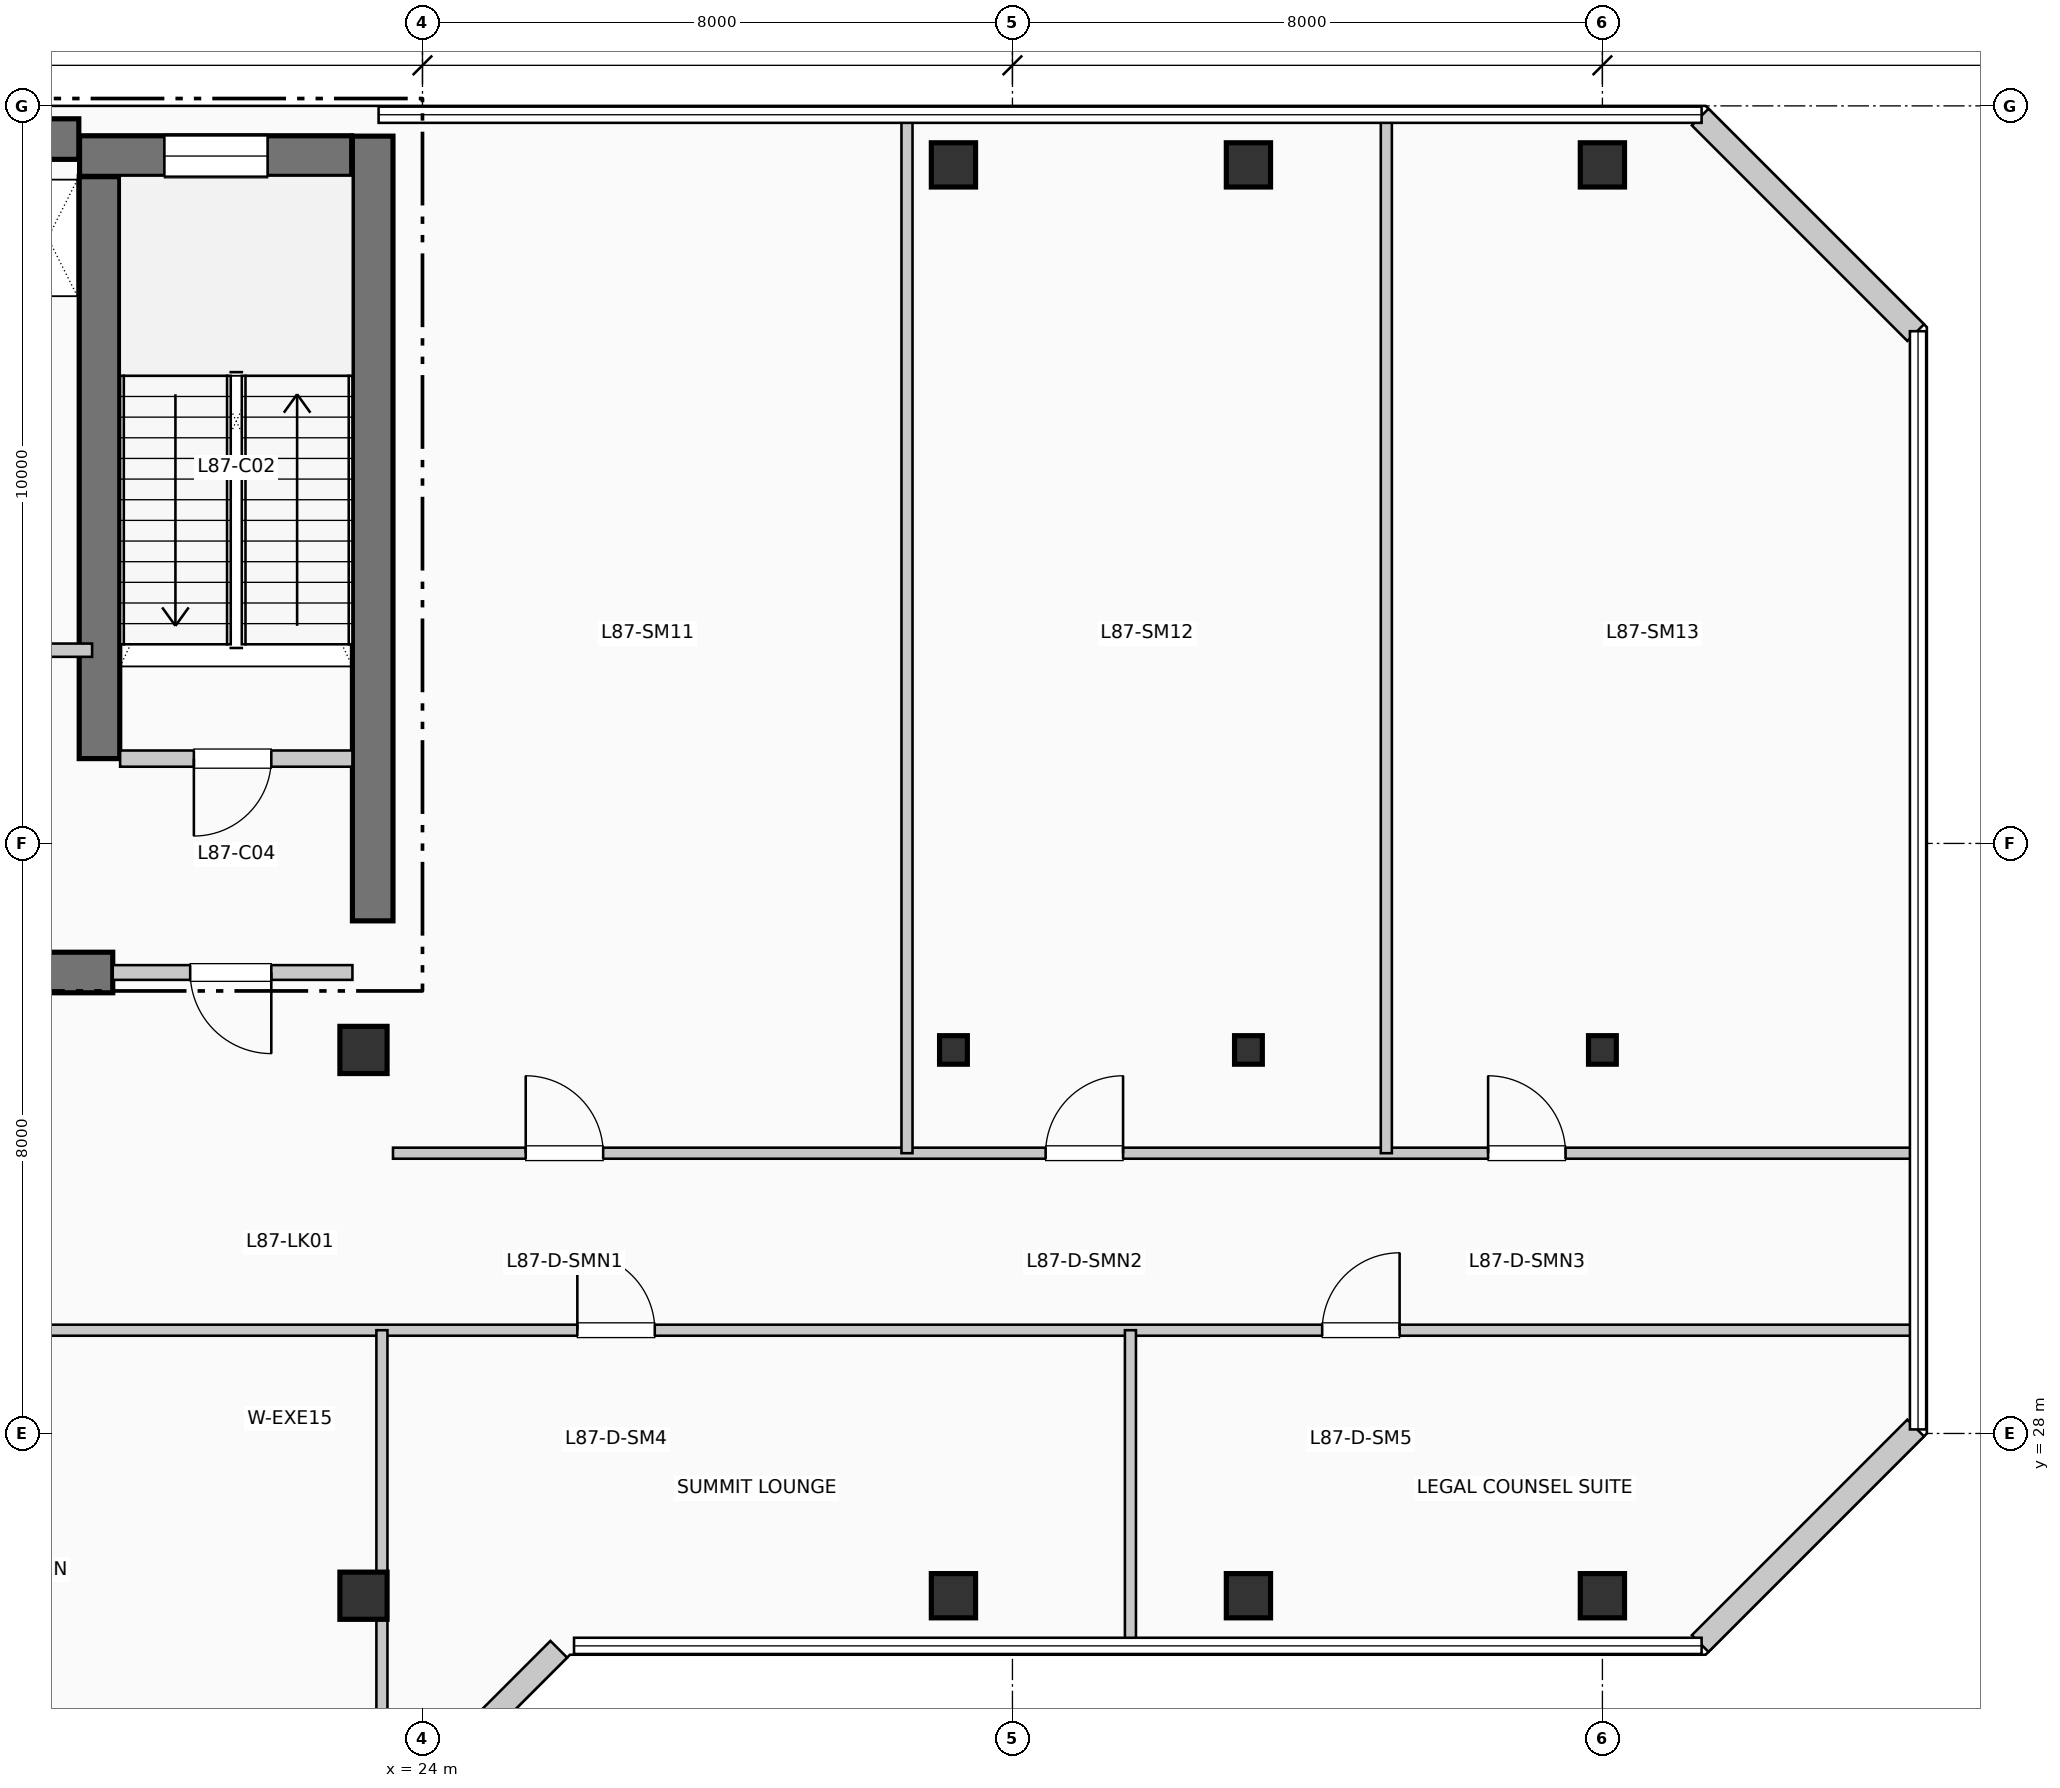
"""IFC4 building model, lengths in metres.
Left out: names, types, materials, properties, quantities, classifications, styles, units other than length and angle.
Written with IfcOpenShell. Run it as: python <this file> out.ifc"""

import sys

from ifc_helpers import new_model, si_unit, direction, frame, frame_2d, origin, origin_2d, place, context, subcontext, project, spatial, rectangle, i_section, extrude, element, fill, save


model = new_model("IFC4")
c1 = context("Model", 3, precision=1e-05, world=origin(), true_north=direction((0.0, 1.0)))
c2 = subcontext(c1, "Body", "Model", "MODEL_VIEW")
j1 = project(units=[si_unit("LENGTHUNIT", "METRE"), si_unit("PLANEANGLEUNIT", "RADIAN")], contexts=[c1])
p1 = place(None, origin())
s1 = spatial("IfcSite", under=j1, at=p1, CompositionType="ELEMENT")
p2 = place(p1, origin())
s2 = spatial("IfcBuilding", under=s1, at=p2, CompositionType="ELEMENT")
p3 = place(p2, frame((0.0, 0.0, 356.73)))
s3 = spatial("IfcBuildingStorey", under=s2, at=p3, CompositionType="ELEMENT", Elevation=356.73)
p4 = place(p3, frame((5.36, 45.55, 0.0), z_axis=(0.0, 0.0, 1.0), x_axis=(1.0, 0.0, 0.0)))
e1 = element("IfcWall", 1, at=p4, inside=s3, PredefinedType="SHEAR", context=c2, shape_type="SweptSolid", body=[
    extrude(rectangle(XDim=13.98, YDim=0.55, at=frame_2d((6.99, 0.0))), origin(), (0.0, 0.0, 1.0), 4.62),
])
p5 = place(p3, frame((23.325, 34.95, 0.0), z_axis=(0.0, 0.0, 1.0), x_axis=(0.0, 1.0, 0.0)))
e2 = element("IfcWall", 2, at=p5, inside=s3, PredefinedType="SHEAR", context=c2, shape_type="SweptSolid", body=[
    extrude(rectangle(XDim=10.64, YDim=0.55, at=frame_2d((5.32, 0.0))), origin(), (0.0, 0.0, 1.0), 4.62),
])
p6 = place(p3, frame((13.68, 34.25, 0.0), z_axis=(0.0, 0.0, 1.0), x_axis=(1.0, 0.0, 0.0)))
e3 = element("IfcWall", 3, at=p6, inside=s3, PredefinedType="SHEAR", context=c2, shape_type="SweptSolid", body=[
    extrude(rectangle(XDim=6.12, YDim=0.55, at=frame_2d((3.06, 0.0))), origin(), (0.0, 0.0, 1.0), 4.62),
])
p7 = place(p3, frame((19.62, 37.15, 0.0), z_axis=(0.0, 0.0, 1.0), x_axis=(0.0, 1.0, 0.0)))
e4 = element("IfcWall", 4, at=p7, inside=s3, PredefinedType="SHEAR", context=c2, shape_type="SweptSolid", body=[
    extrude(rectangle(XDim=7.89, YDim=0.55, at=frame_2d((3.945, 0.0))), origin(), (0.0, 0.0, 1.0), 4.62),
])
p8 = place(p3, frame((19.35, 45.32, 0.0), z_axis=(0.0, 0.0, 1.0), x_axis=(1.0, 0.0, 0.0)))
e5 = element("IfcWall", 5, at=p8, inside=s3, PredefinedType="SHEAR", context=c2, shape_type="SweptSolid", body=[
    extrude(rectangle(XDim=3.69, YDim=0.55, at=frame_2d((1.845, 0.0))), origin(), (0.0, 0.0, 1.0), 4.62),
])
p9 = place(p8, frame((1.15, 0.0, 1.05)))
e6 = element("IfcOpeningElement", 6, at=p9, cuts=e5, PredefinedType="OPENING", context=c2, shape_type="SweptSolid", body=[
    extrude(rectangle(XDim=1.4, YDim=1.8, at=frame_2d((0.7, 0.9))), frame((0.0, 0.285, 0.0), z_axis=(0.0, -1.0, 0.0), x_axis=(1.0, 0.0, 0.0)), (0.0, 0.0, 1.0), 0.57),
])
for number, where, z_axis, x_axis in (
    (7, (23.2, 25.8, 0.0), (0.0, 0.0, 1.0), (1.0, 0.0, 0.0)),
    (8, (23.2, 33.2, 0.0), (0.0, 0.0, 1.0), (1.0, 0.0, 0.0)),
):
    element("IfcColumn", number, at=place(p3, frame(where, z_axis=z_axis, x_axis=x_axis)), inside=s3, PredefinedType="COLUMN", context=c2, shape_type="SweptSolid", body=[
        extrude(rectangle(XDim=0.64, YDim=0.64, at=origin_2d()), origin(), (0.0, 0.0, 1.0), 4.62),
    ])
p10 = place(p3, frame((31.2, 25.8, 0.0), z_axis=(0.0, 0.0, 1.0), x_axis=(1.0, 0.0, 0.0)))
e9 = element("IfcColumn", 9, at=p10, inside=s3, PredefinedType="COLUMN", context=c2, shape_type="SweptSolid", body=[
    extrude(rectangle(XDim=0.6, YDim=0.6, at=origin_2d()), origin(), (0.0, 0.0, 1.0), 4.62),
])
p11 = place(p3, frame((31.2, 33.2, 0.0), z_axis=(0.0, 0.0, 1.0), x_axis=(1.0, 0.0, 0.0)))
e10 = element("IfcColumn", 10, at=p11, inside=s3, PredefinedType="COLUMN", context=c2, shape_type="SweptSolid", body=[
    extrude(i_section(OverallWidth=0.377, OverallDepth=0.387, WebThickness=0.016, FlangeThickness=0.027, at=origin_2d()), origin(), (0.0, 0.0, 1.0), 4.62),
])
for number, where, z_axis, x_axis in (
    (11, (31.2, 45.2, 0.0), (0.0, 0.0, 1.0), (1.0, 0.0, 0.0)),
    (12, (35.2, 25.8, 0.0), (0.0, 0.0, 1.0), (1.0, 0.0, 0.0)),
):
    element("IfcColumn", number, at=place(p3, frame(where, z_axis=z_axis, x_axis=x_axis)), inside=s3, PredefinedType="COLUMN", context=c2, shape_type="SweptSolid", body=[
        extrude(rectangle(XDim=0.6, YDim=0.6, at=origin_2d()), origin(), (0.0, 0.0, 1.0), 4.62),
    ])
p12 = place(p3, frame((35.2, 33.2, 0.0), z_axis=(0.0, 0.0, 1.0), x_axis=(1.0, 0.0, 0.0)))
e13 = element("IfcColumn", 13, at=p12, inside=s3, PredefinedType="COLUMN", context=c2, shape_type="SweptSolid", body=[
    extrude(i_section(OverallWidth=0.377, OverallDepth=0.387, WebThickness=0.016, FlangeThickness=0.027, at=origin_2d()), origin(), (0.0, 0.0, 1.0), 4.62),
])
for number, where, z_axis, x_axis in (
    (14, (35.2, 45.2, 0.0), (0.0, 0.0, 1.0), (1.0, 0.0, 0.0)),
    (15, (40.0, 25.8, 0.0), (0.0, 0.0, 1.0), (1.0, 0.0, 0.0)),
):
    element("IfcColumn", number, at=place(p3, frame(where, z_axis=z_axis, x_axis=x_axis)), inside=s3, PredefinedType="COLUMN", context=c2, shape_type="SweptSolid", body=[
        extrude(rectangle(XDim=0.6, YDim=0.6, at=origin_2d()), origin(), (0.0, 0.0, 1.0), 4.62),
    ])
p13 = place(p3, frame((40.0, 33.2, 0.0), z_axis=(0.0, 0.0, 1.0), x_axis=(1.0, 0.0, 0.0)))
e16 = element("IfcColumn", 16, at=p13, inside=s3, PredefinedType="COLUMN", context=c2, shape_type="SweptSolid", body=[
    extrude(i_section(OverallWidth=0.377, OverallDepth=0.387, WebThickness=0.016, FlangeThickness=0.027, at=origin_2d()), origin(), (0.0, 0.0, 1.0), 4.62),
])
p14 = place(p3, frame((40.0, 45.2, 0.0), z_axis=(0.0, 0.0, 1.0), x_axis=(1.0, 0.0, 0.0)))
e17 = element("IfcColumn", 17, at=p14, inside=s3, PredefinedType="COLUMN", context=c2, shape_type="SweptSolid", body=[
    extrude(rectangle(XDim=0.6, YDim=0.6, at=origin_2d()), origin(), (0.0, 0.0, 1.0), 4.62),
])
p15 = place(p3, frame((23.926, 23.152, 0.0), z_axis=(0.0, 0.0, 1.0), x_axis=(0.707106781187, 0.707106781187, 0.0)))
e18 = element("IfcWall", 18, at=p15, inside=s3, PredefinedType="SOLIDWALL", context=c2, shape_type="SweptSolid", body=[
    extrude(rectangle(XDim=2.718, YDim=0.32, at=frame_2d((1.359, 0.0))), origin(), (0.0, 0.0, 1.0), 4.37),
])
for number, where, z_axis, x_axis in (
    (19, (41.326, 25.152, 0.0), (0.0, 0.0, 1.0), (0.707, 0.707, 0.0)),
    (20, (44.248, 42.926, 0.0), (0.0, 0.0, 1.0), (-0.707, 0.707, 0.0)),
):
    element("IfcWall", number, at=place(p3, frame(where, z_axis=z_axis, x_axis=x_axis)), inside=s3, PredefinedType="SOLIDWALL", context=c2, shape_type="SweptSolid", body=[
        extrude(rectangle(XDim=4.133, YDim=0.32, at=frame_2d((2.066, 0.0))), origin(), (0.0, 0.0, 1.0), 4.37),
    ])
p16 = place(p3, frame((19.9, 37.15, 0.0), z_axis=(0.0, 0.0, 1.0), x_axis=(1.0, 0.0, 0.0)))
e21 = element("IfcWall", 21, at=p16, inside=s3, PredefinedType="PARTITIONING", context=c2, shape_type="SweptSolid", body=[
    extrude(rectangle(XDim=3.15, YDim=0.22, at=frame_2d((1.575, 0.0))), origin(), (0.0, 0.0, 1.0), 4.37),
])
p17 = place(p16, frame((2.05, 0.0, 0.0), z_axis=(0.0, 0.0, 1.0), x_axis=(-1.0, 0.0, 0.0)))
e22 = element("IfcOpeningElement", 22, at=p17, cuts=e21, PredefinedType="OPENING", context=c2, shape_type="SweptSolid", body=[
    extrude(rectangle(XDim=1.05, YDim=2.15, at=frame_2d((0.525, 1.075))), frame((0.0, 0.12, 0.0), z_axis=(0.0, -1.0, 0.0), x_axis=(1.0, 0.0, 0.0)), (0.0, 0.0, 1.0), 0.24),
])
p18 = place(p3, frame((19.8, 34.25, 0.0), z_axis=(0.0, 0.0, 1.0), x_axis=(1.0, 0.0, 0.0)))
e23 = element("IfcWall", 23, at=p18, inside=s3, PredefinedType="PARTITIONING", context=c2, shape_type="SweptSolid", body=[
    extrude(rectangle(XDim=3.25, YDim=0.2, at=frame_2d((1.625, 0.0))), origin(), (0.0, 0.0, 1.0), 4.37),
])
p19 = place(p18, frame((2.15, 0.0, 0.0), z_axis=(0.0, 0.0, 1.0), x_axis=(-1.0, 0.0, 0.0)))
e24 = element("IfcOpeningElement", 24, at=p19, cuts=e23, PredefinedType="OPENING", context=c2, shape_type="SweptSolid", body=[
    extrude(rectangle(XDim=1.1, YDim=2.15, at=frame_2d((0.55, 1.075))), frame((0.0, 0.11, 0.0), z_axis=(0.0, -1.0, 0.0), x_axis=(1.0, 0.0, 0.0)), (0.0, 0.0, 1.0), 0.22),
])
p20 = place(p3, frame((17.68, 38.62, 0.0), z_axis=(0.0, 0.0, 1.0), x_axis=(1.0, 0.0, 0.0)))
e25 = element("IfcWall", 25, at=p20, inside=s3, PredefinedType="PARTITIONING", context=c2, shape_type="SweptSolid", body=[
    extrude(rectangle(XDim=1.84, YDim=0.18, at=frame_2d((0.92, 0.0))), origin(), (0.0, 0.0, 1.0), 4.37),
])
p21 = place(p20, frame((0.24, 0.0, 0.0)))
e26 = element("IfcOpeningElement", 26, at=p21, cuts=e25, PredefinedType="OPENING", context=c2, shape_type="SweptSolid", body=[
    extrude(rectangle(XDim=0.92, YDim=2.1, at=frame_2d((0.46, 1.05))), frame((0.0, 0.1, 0.0), z_axis=(0.0, -1.0, 0.0), x_axis=(1.0, 0.0, 0.0)), (0.0, 0.0, 1.0), 0.2),
])
p22 = place(p3, frame((0.19, 29.4, 0.0), z_axis=(0.0, 0.0, 1.0), x_axis=(1.0, 0.0, 0.0)))
e27 = element("IfcWall", 27, at=p22, inside=s3, PredefinedType="PARTITIONING", context=c2, shape_type="SweptSolid", body=[
    extrude(rectangle(XDim=44.02, YDim=0.15, at=frame_2d((22.01, 0.0))), origin(), (0.0, 0.0, 1.0), 4.055),
])
p23 = place(p22, frame((8.76, 0.0, 0.0)))
e28 = element("IfcOpeningElement", 28, at=p23, cuts=e27, PredefinedType="OPENING", context=c2, shape_type="SweptSolid", body=[
    extrude(rectangle(XDim=1.8, YDim=2.3, at=frame_2d((0.9, 1.15))), frame((0.0, 0.085, 0.0), z_axis=(0.0, -1.0, 0.0), x_axis=(1.0, 0.0, 0.0)), (0.0, 0.0, 1.0), 0.17),
])
p24 = place(p22, frame((25.91, 0.0, 0.0)))
e29 = element("IfcOpeningElement", 29, at=p24, cuts=e27, PredefinedType="OPENING", context=c2, shape_type="SweptSolid", body=[
    extrude(rectangle(XDim=1.05, YDim=2.15, at=frame_2d((0.525, 1.075))), frame((0.0, 0.085, 0.0), z_axis=(0.0, -1.0, 0.0), x_axis=(1.0, 0.0, 0.0)), (0.0, 0.0, 1.0), 0.17),
])
p25 = place(p22, frame((36.01, 0.0, 0.0)))
e30 = element("IfcOpeningElement", 30, at=p25, cuts=e27, PredefinedType="OPENING", context=c2, shape_type="SweptSolid", body=[
    extrude(rectangle(XDim=1.05, YDim=2.15, at=frame_2d((0.525, 1.075))), frame((0.0, 0.085, 0.0), z_axis=(0.0, -1.0, 0.0), x_axis=(1.0, 0.0, 0.0)), (0.0, 0.0, 1.0), 0.17),
])
p26 = place(p3, frame((23.6, 31.8, 0.0), z_axis=(0.0, 0.0, 1.0), x_axis=(1.0, 0.0, 0.0)))
e31 = element("IfcWall", 31, at=p26, inside=s3, PredefinedType="PARTITIONING", context=c2, shape_type="SweptSolid", body=[
    extrude(rectangle(XDim=20.61, YDim=0.15, at=frame_2d((10.305, 0.0))), origin(), (0.0, 0.0, 1.0), 4.37),
])
p27 = place(p26, frame((1.8, 0.0, 0.0)))
e32 = element("IfcOpeningElement", 32, at=p27, cuts=e31, PredefinedType="OPENING", context=c2, shape_type="SweptSolid", body=[
    extrude(rectangle(XDim=1.05, YDim=2.15, at=frame_2d((0.525, 1.075))), frame((0.0, 0.085, 0.0), z_axis=(0.0, -1.0, 0.0), x_axis=(1.0, 0.0, 0.0)), (0.0, 0.0, 1.0), 0.17),
])
p28 = place(p26, frame((8.85, 0.0, 0.0)))
e33 = element("IfcOpeningElement", 33, at=p28, cuts=e31, PredefinedType="OPENING", context=c2, shape_type="SweptSolid", body=[
    extrude(rectangle(XDim=1.05, YDim=2.15, at=frame_2d((0.525, 1.075))), frame((0.0, 0.085, 0.0), z_axis=(0.0, -1.0, 0.0), x_axis=(1.0, 0.0, 0.0)), (0.0, 0.0, 1.0), 0.17),
])
p29 = place(p26, frame((14.85, 0.0, 0.0)))
e34 = element("IfcOpeningElement", 34, at=p29, cuts=e31, PredefinedType="OPENING", context=c2, shape_type="SweptSolid", body=[
    extrude(rectangle(XDim=1.05, YDim=2.15, at=frame_2d((0.525, 1.075))), frame((0.0, 0.085, 0.0), z_axis=(0.0, -1.0, 0.0), x_axis=(1.0, 0.0, 0.0)), (0.0, 0.0, 1.0), 0.17),
])
p30 = place(p3, frame((23.45, 12.64, 0.0), z_axis=(0.0, 0.0, 1.0), x_axis=(0.0, 1.0, 0.0)))
e35 = element("IfcWall", 35, at=p30, inside=s3, PredefinedType="PARTITIONING", context=c2, shape_type="SweptSolid", body=[
    extrude(rectangle(XDim=16.76, YDim=0.15, at=frame_2d((8.38, 0.0))), origin(), (0.0, 0.0, 1.0), 3.855),
])
p31 = place(p3, frame((33.6, 25.19, 0.0), z_axis=(0.0, 0.0, 1.0), x_axis=(0.0, 1.0, 0.0)))
e36 = element("IfcWall", 36, at=p31, inside=s3, PredefinedType="PARTITIONING", context=c2, shape_type="SweptSolid", body=[
    extrude(rectangle(XDim=4.21, YDim=0.15, at=frame_2d((2.105, 0.0))), origin(), (0.0, 0.0, 1.0), 4.37),
])
for number, where, z_axis, x_axis in (
    (37, (30.57, 31.8, 0.0), (0.0, 0.0, 1.0), (0.0, 1.0, 0.0)),
    (38, (37.07, 31.8, 0.0), (0.0, 0.0, 1.0), (0.0, 1.0, 0.0)),
):
    element("IfcWall", number, at=place(p3, frame(where, z_axis=z_axis, x_axis=x_axis)), inside=s3, PredefinedType="PARTITIONING", context=c2, shape_type="SweptSolid", body=[
        extrude(rectangle(XDim=14.01, YDim=0.15, at=frame_2d((7.005, 0.0))), origin(), (0.0, 0.0, 1.0), 4.37),
    ])
p32 = place(p9, origin())
e39 = element("IfcWindow", 39, at=p32, inside=s3, PartitioningType="SINGLE_PANEL", PredefinedType="WINDOW", context=c2, shape_type="SweptSolid", body=[
    extrude(rectangle(XDim=1.4, YDim=1.8, at=frame_2d((0.7, 0.9))), frame((0.0, 0.03, 0.0), z_axis=(0.0, -1.0, 0.0), x_axis=(1.0, 0.0, 0.0)), (0.0, 0.0, 1.0), 0.06),
])
fill(e6, e39)
p33 = place(p17, origin())
e40 = element("IfcDoor", 40, at=p33, inside=s3, OperationType="SINGLE_SWING_LEFT", PredefinedType="DOOR", context=c2, shape_type="SweptSolid", body=[
    extrude(rectangle(XDim=1.05, YDim=2.15, at=frame_2d((0.525, 1.075))), frame((0.0, 0.025, 0.0), z_axis=(0.0, -1.0, 0.0), x_axis=(1.0, 0.0, 0.0)), (0.0, 0.0, 1.0), 0.05),
])
fill(e22, e40)
p34 = place(p19, origin())
e41 = element("IfcDoor", 41, at=p34, inside=s3, OperationType="SINGLE_SWING_RIGHT", PredefinedType="DOOR", context=c2, shape_type="SweptSolid", body=[
    extrude(rectangle(XDim=1.1, YDim=2.15, at=frame_2d((0.55, 1.075))), frame((0.0, 0.025, 0.0), z_axis=(0.0, -1.0, 0.0), x_axis=(1.0, 0.0, 0.0)), (0.0, 0.0, 1.0), 0.05),
])
fill(e24, e41)
p35 = place(p24, origin())
e42 = element("IfcDoor", 42, at=p35, inside=s3, OperationType="SINGLE_SWING_LEFT", PredefinedType="DOOR", context=c2, shape_type="SweptSolid", body=[
    extrude(rectangle(XDim=1.05, YDim=2.15, at=frame_2d((0.525, 1.075))), frame((0.0, 0.025, 0.0), z_axis=(0.0, -1.0, 0.0), x_axis=(1.0, 0.0, 0.0)), (0.0, 0.0, 1.0), 0.05),
])
fill(e29, e42)
p36 = place(p25, origin())
e43 = element("IfcDoor", 43, at=p36, inside=s3, OperationType="SINGLE_SWING_RIGHT", PredefinedType="DOOR", context=c2, shape_type="SweptSolid", body=[
    extrude(rectangle(XDim=1.05, YDim=2.15, at=frame_2d((0.525, 1.075))), frame((0.0, 0.025, 0.0), z_axis=(0.0, -1.0, 0.0), x_axis=(1.0, 0.0, 0.0)), (0.0, 0.0, 1.0), 0.05),
])
fill(e30, e43)
p37 = place(p27, origin())
e44 = element("IfcDoor", 44, at=p37, inside=s3, OperationType="SINGLE_SWING_LEFT", PredefinedType="DOOR", context=c2, shape_type="SweptSolid", body=[
    extrude(rectangle(XDim=1.05, YDim=2.15, at=frame_2d((0.525, 1.075))), frame((0.0, 0.025, 0.0), z_axis=(0.0, -1.0, 0.0), x_axis=(1.0, 0.0, 0.0)), (0.0, 0.0, 1.0), 0.05),
])
fill(e32, e44)
p38 = place(p28, origin())
e45 = element("IfcDoor", 45, at=p38, inside=s3, OperationType="SINGLE_SWING_RIGHT", PredefinedType="DOOR", context=c2, shape_type="SweptSolid", body=[
    extrude(rectangle(XDim=1.05, YDim=2.15, at=frame_2d((0.525, 1.075))), frame((0.0, 0.025, 0.0), z_axis=(0.0, -1.0, 0.0), x_axis=(1.0, 0.0, 0.0)), (0.0, 0.0, 1.0), 0.05),
])
fill(e33, e45)
p39 = place(p29, origin())
e46 = element("IfcDoor", 46, at=p39, inside=s3, OperationType="SINGLE_SWING_LEFT", PredefinedType="DOOR", context=c2, shape_type="SweptSolid", body=[
    extrude(rectangle(XDim=1.05, YDim=2.15, at=frame_2d((0.525, 1.075))), frame((0.0, 0.025, 0.0), z_axis=(0.0, -1.0, 0.0), x_axis=(1.0, 0.0, 0.0)), (0.0, 0.0, 1.0), 0.05),
])
fill(e34, e46)
save(model, sys.argv[1])
